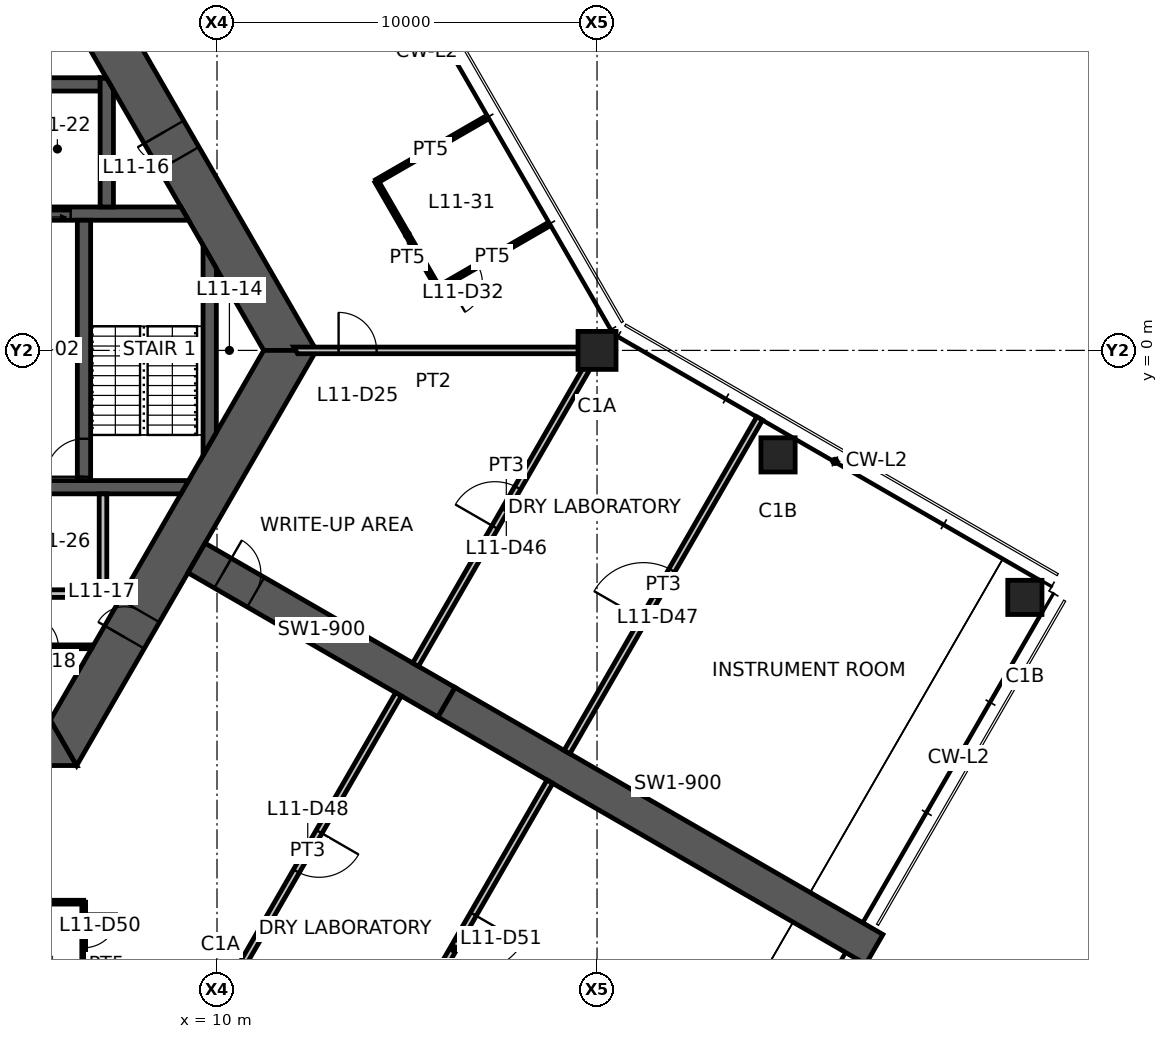
"""IFC4 building model, lengths in metres.
Left out: names, types, materials, properties, quantities, classifications, styles, units other than length and angle.
Written with IfcOpenShell. Run it as: python <this file> out.ifc"""

import sys

from ifc_helpers import new_model, si_unit, direction, frame, frame_2d, origin, origin_2d, place, context, subcontext, project, spatial, polyline, rectangle, hollow_rectangle, outline, extrude, element, fill, save


model = new_model("IFC4")
c1 = context("Model", 3, precision=1e-05, world=origin(), true_north=direction((0.0, 1.0)))
c2 = subcontext(c1, "Body", "Model", "MODEL_VIEW")
j1 = project(units=[si_unit("LENGTHUNIT", "METRE"), si_unit("PLANEANGLEUNIT", "RADIAN")], contexts=[c1])
p1 = place(None, origin())
s1 = spatial("IfcSite", under=j1, at=p1, CompositionType="ELEMENT")
p2 = place(p1, origin())
s2 = spatial("IfcBuilding", under=s1, at=p2, CompositionType="ELEMENT")
p3 = place(p2, frame((0.0, 0.0, 43.6)))
s3 = spatial("IfcBuildingStorey", under=s2, at=p3, CompositionType="ELEMENT", Elevation=43.6)
p4 = place(p3, frame((20.0, 0.0, 0.0), z_axis=(0.0, 0.0, 1.0), x_axis=(1.0, 0.0, 0.0)))
e1 = element("IfcColumn", 1, at=p4, inside=s3, PredefinedType="COLUMN", context=c2, shape_type="SweptSolid", body=[
    extrude(hollow_rectangle(XDim=1.0, YDim=1.0, WallThickness=0.06, at=origin_2d()), origin(), (0.0, 0.0, 1.0), 4.2),
])
for number, where, z_axis, x_axis in (
    (2, (24.763, -2.75, 0.0), (0.0, 0.0, 1.0), (1.0, 0.0, 0.0)),
    (3, (31.258, -6.5, 0.0), (0.0, 0.0, 1.0), (1.0, 0.0, 0.0)),
):
    element("IfcColumn", number, at=place(p3, frame(where, z_axis=z_axis, x_axis=x_axis)), inside=s3, PredefinedType="COLUMN", context=c2, shape_type="SweptSolid", body=[
        extrude(hollow_rectangle(XDim=0.9, YDim=0.9, WallThickness=0.05, at=origin_2d()), origin(), (0.0, 0.0, 1.0), 4.2),
    ])
p5 = place(p3, frame((11.922, 0.0, 0.0), z_axis=(0.0, 0.0, 1.0), x_axis=(-0.500004296715, 0.866022923061, 0.0)))
e4 = element("IfcWall", 4, at=p5, inside=s3, PredefinedType="SHEAR", context=c2, shape_type="SweptSolid", body=[
    extrude(outline(polyline([(-0.346, -0.6), (5.835, -0.6), (6.635, -0.6), (12.269, -0.6), (11.576, 0.6), (6.635, 0.6), (5.835, 0.6), (0.346, 0.6), (-0.346, -0.6)])), origin(), (0.0, 0.0, 1.0), 4.2),
])
p6 = place(p5, frame((5.835, 0.0, 0.0)))
e5 = element("IfcOpeningElement", 5, at=p6, cuts=e4, PredefinedType="OPENING", context=c2, shape_type="SweptSolid", body=[
    extrude(rectangle(XDim=0.8, YDim=2.1, at=frame_2d((0.4, 1.05))), frame((0.0, 0.61, 0.0), z_axis=(0.0, -1.0, 0.0), x_axis=(1.0, 0.0, 0.0)), (0.0, 0.0, 1.0), 1.22),
])
p7 = place(p3, frame((-5.961, -10.325, 0.0), z_axis=(0.0, 0.0, 1.0), x_axis=(1.0, 0.0, 0.0)))
e6 = element("IfcWall", 6, at=p7, inside=s3, PredefinedType="SHEAR", context=c2, shape_type="SweptSolid", body=[
    extrude(outline(polyline([(-0.346, -0.6), (5.461, -0.6), (6.461, -0.6), (12.269, -0.6), (11.576, 0.6), (6.461, 0.6), (5.461, 0.6), (0.346, 0.6), (-0.346, -0.6)])), origin(), (0.0, 0.0, 1.0), 4.2),
])
p8 = place(p7, frame((5.461, 0.0, 0.0)))
e7 = element("IfcOpeningElement", 7, at=p8, cuts=e6, PredefinedType="OPENING", context=c2, shape_type="SweptSolid", body=[
    extrude(rectangle(XDim=1.0, YDim=2.1, at=frame_2d((0.5, 1.05))), frame((0.0, 0.61, 0.0), z_axis=(0.0, -1.0, 0.0), x_axis=(1.0, 0.0, 0.0)), (0.0, 0.0, 1.0), 1.22),
])
p9 = place(p3, frame((5.961, -10.325, 0.0), z_axis=(0.0, 0.0, 1.0), x_axis=(0.500004296715, 0.866022923061, 0.0)))
e8 = element("IfcWall", 8, at=p9, inside=s3, PredefinedType="SHEAR", context=c2, shape_type="SweptSolid", body=[
    extrude(outline(polyline([(-0.346, -0.6), (3.208, -0.6), (4.009, -0.6), (12.269, -0.6), (11.576, 0.6), (4.009, 0.6), (3.208, 0.6), (0.346, 0.6), (-0.346, -0.6)])), origin(), (0.0, 0.0, 1.0), 4.2),
])
p10 = place(p9, frame((3.208, 0.0, 0.0)))
e9 = element("IfcOpeningElement", 9, at=p10, cuts=e8, PredefinedType="OPENING", context=c2, shape_type="SweptSolid", body=[
    extrude(rectangle(XDim=0.8, YDim=2.1, at=frame_2d((0.4, 1.05))), frame((0.0, 0.61, 0.0), z_axis=(0.0, -1.0, 0.0), x_axis=(1.0, 0.0, 0.0)), (0.0, 0.0, 1.0), 1.22),
])
p11 = place(p3, frame((9.461, -5.462, 0.0), z_axis=(0.0, 0.0, 1.0), x_axis=(0.866019116917, -0.500010889016, 0.0)))
e10 = element("IfcWall", 10, at=p11, inside=s3, PredefinedType="SHEAR", context=c2, shape_type="SweptSolid", body=[
    extrude(rectangle(XDim=7.595, YDim=0.9, at=frame_2d((3.798, 0.0))), origin(), (0.0, 0.0, 1.0), 4.2),
])
p12 = place(p11, frame((0.8, 0.0, 0.0)))
e11 = element("IfcOpeningElement", 11, at=p12, cuts=e10, PredefinedType="OPENING", context=c2, shape_type="SweptSolid", body=[
    extrude(rectangle(XDim=1.0, YDim=2.1, at=frame_2d((0.5, 1.05))), frame((0.0, 0.46, 0.0), z_axis=(0.0, -1.0, 0.0), x_axis=(1.0, 0.0, 0.0)), (0.0, 0.0, 1.0), 0.92),
])
p13 = place(p3, frame((16.039, -9.26, 0.0), z_axis=(0.0, 0.0, 1.0), x_axis=(0.866024837091, -0.50000098154, 0.0)))
e12 = element("IfcWall", 12, at=p13, inside=s3, PredefinedType="SHEAR", context=c2, shape_type="SweptSolid", body=[
    extrude(rectangle(XDim=13.0, YDim=0.9, at=frame_2d((6.5, 0.0))), origin(), (0.0, 0.0, 1.0), 4.2),
])
p14 = place(p3, frame((1.425, 3.6, 0.0), z_axis=(0.0, 0.0, 1.0), x_axis=(1.0, 0.0, 0.0)))
e13 = element("IfcWall", 13, at=p14, inside=s3, PredefinedType="SHEAR", context=c2, shape_type="SweptSolid", body=[
    extrude(outline(polyline([(0.0, -0.175), (3.425, -0.175), (4.725, -0.175), (7.827, -0.175), (7.625, 0.175), (4.725, 0.175), (3.425, 0.175), (0.0, 0.175), (0.0, -0.175)])), origin(), (0.0, 0.0, 1.0), 4.2),
])
p15 = place(p14, frame((3.425, 0.0, 0.0)))
e14 = element("IfcOpeningElement", 14, at=p15, cuts=e13, PredefinedType="OPENING", context=c2, shape_type="SweptSolid", body=[
    extrude(rectangle(XDim=1.3, YDim=2.1, at=frame_2d((0.65, 1.05))), frame((0.0, 0.185, 0.0), z_axis=(0.0, -1.0, 0.0), x_axis=(1.0, 0.0, 0.0)), (0.0, 0.0, 1.0), 0.37),
])
p16 = place(p3, frame((1.425, -3.6, 0.0), z_axis=(0.0, 0.0, 1.0), x_axis=(1.0, 0.0, 0.0)))
e15 = element("IfcWall", 15, at=p16, inside=s3, PredefinedType="SHEAR", context=c2, shape_type="SweptSolid", body=[
    extrude(outline(polyline([(0.0, -0.175), (1.125, -0.175), (2.125, -0.175), (7.625, -0.175), (7.827, 0.175), (2.125, 0.175), (1.125, 0.175), (0.0, 0.175), (0.0, -0.175)])), origin(), (0.0, 0.0, 1.0), 4.2),
])
p17 = place(p16, frame((1.125, 0.0, 0.0)))
e16 = element("IfcOpeningElement", 16, at=p17, cuts=e15, PredefinedType="OPENING", context=c2, shape_type="SweptSolid", body=[
    extrude(rectangle(XDim=1.0, YDim=2.1, at=frame_2d((0.5, 1.05))), frame((0.0, 0.185, 0.0), z_axis=(0.0, -1.0, 0.0), x_axis=(1.0, 0.0, 0.0)), (0.0, 0.0, 1.0), 0.37),
])
p18 = place(p3, frame((6.5, -3.425, 0.0), z_axis=(0.0, 0.0, 1.0), x_axis=(0.0, 1.0, 0.0)))
e17 = element("IfcWall", 17, at=p18, inside=s3, PredefinedType="SHEAR", context=c2, shape_type="SweptSolid", body=[
    extrude(rectangle(XDim=6.85, YDim=0.35, at=frame_2d((3.425, 0.0))), origin(), (0.0, 0.0, 1.0), 4.2),
])
p19 = place(p18, frame((0.1, 0.0, 0.0)))
e18 = element("IfcOpeningElement", 18, at=p19, cuts=e17, PredefinedType="OPENING", context=c2, shape_type="SweptSolid", body=[
    extrude(rectangle(XDim=1.0, YDim=2.1, at=frame_2d((0.5, 1.05))), frame((0.0, 0.185, 0.0), z_axis=(0.0, -1.0, 0.0), x_axis=(1.0, 0.0, 0.0)), (0.0, 0.0, 1.0), 0.37),
])
p20 = place(p3, frame((4.675, 7.0, 0.0), z_axis=(0.0, 0.0, 1.0), x_axis=(1.0, 0.0, 0.0)))
e19 = element("IfcWall", 19, at=p20, inside=s3, PredefinedType="SHEAR", context=c2, shape_type="SweptSolid", body=[
    extrude(rectangle(XDim=2.25, YDim=0.35, at=frame_2d((1.125, 0.0))), origin(), (0.0, 0.0, 1.0), 4.2),
])
p21 = place(p3, frame((7.1, 3.775, 0.0), z_axis=(0.0, 0.0, 1.0), x_axis=(0.0, 1.0, 0.0)))
e20 = element("IfcWall", 20, at=p21, inside=s3, PredefinedType="SHEAR", context=c2, shape_type="SweptSolid", body=[
    extrude(outline(polyline([(0.0, -0.175), (3.074, -0.175), (3.377, 0.0), (3.4, 0.175), (0.0, 0.175), (0.0, -0.175)])), origin(), (0.0, 0.0, 1.0), 4.2),
])
p22 = place(p3, frame((9.808, -2.462, 0.0), z_axis=(0.0, 0.0, 1.0), x_axis=(0.0, 1.0, 0.0)))
e21 = element("IfcWall", 21, at=p22, inside=s3, PredefinedType="SHEAR", context=c2, shape_type="SweptSolid", body=[
    extrude(outline(polyline([(0.303, -0.175), (4.621, -0.175), (5.228, 0.175), (-0.303, 0.175), (0.303, -0.175)])), origin(), (0.0, 0.0, 1.0), 4.2),
])
p23 = place(p3, frame((4.675, -6.4, 0.0), z_axis=(0.0, 0.0, 1.0), x_axis=(1.0, 0.0, 0.0)))
e22 = element("IfcWall", 22, at=p23, inside=s3, PredefinedType="STANDARD", context=c2, shape_type="SweptSolid", body=[
    extrude(rectangle(XDim=2.425, YDim=0.2, at=frame_2d((1.212, 0.0))), origin(), (0.0, 0.0, 1.0), 4.2),
])
p24 = place(p3, frame((7.0, -3.775, 0.0), z_axis=(0.0, 0.0, 1.0), x_axis=(0.0, -1.0, 0.0)))
e23 = element("IfcWall", 23, at=p24, inside=s3, PredefinedType="STANDARD", context=c2, shape_type="SweptSolid", body=[
    extrude(rectangle(XDim=2.525, YDim=0.2, at=frame_2d((1.263, 0.0))), origin(), (0.0, 0.0, 1.0), 4.2),
])
p25 = place(p3, frame((4.675, -7.8, 0.0), z_axis=(0.0, 0.0, 1.0), x_axis=(1.0, 0.0, 0.0)))
e24 = element("IfcWall", 24, at=p25, inside=s3, PredefinedType="PARTITIONING", context=c2, shape_type="SweptSolid", body=[
    extrude(outline(polyline([(0.0, -0.05), (0.35, -0.05), (1.15, -0.05), (2.022, -0.05), (2.051, 0.0), (2.057, 0.05), (1.15, 0.05), (0.35, 0.05), (0.0, 0.05), (0.0, -0.05)])), origin(), (0.0, 0.0, 1.0), 3.23),
])
p26 = place(p25, frame((0.35, 0.0, 0.0)))
e25 = element("IfcOpeningElement", 25, at=p26, cuts=e24, PredefinedType="OPENING", context=c2, shape_type="SweptSolid", body=[
    extrude(rectangle(XDim=0.8, YDim=2.1, at=frame_2d((0.4, 1.05))), frame((0.0, 0.06, 0.0), z_axis=(0.0, -1.0, 0.0), x_axis=(1.0, 0.0, 0.0)), (0.0, 0.0, 1.0), 0.12),
])
p27 = place(p3, frame((12.07, 0.0, 0.0), z_axis=(0.0, 0.0, 1.0), x_axis=(1.0, 0.0, 0.0)))
e26 = element("IfcWall", 26, at=p27, inside=s3, PredefinedType="PARTITIONING", context=c2, shape_type="SweptSolid", body=[
    extrude(outline(polyline([(0.051, -0.087), (1.129, -0.087), (2.129, -0.087), (7.93, -0.087), (7.93, 0.087), (2.129, 0.087), (1.129, 0.087), (-0.051, 0.087), (0.051, -0.087)])), origin(), (0.0, 0.0, 1.0), 3.33),
])
p28 = place(p27, frame((1.129, 0.0, 0.0)))
e27 = element("IfcOpeningElement", 27, at=p28, cuts=e26, PredefinedType="OPENING", context=c2, shape_type="SweptSolid", body=[
    extrude(rectangle(XDim=1.0, YDim=2.1, at=frame_2d((0.5, 1.05))), frame((0.0, 0.098, 0.0), z_axis=(0.0, -1.0, 0.0), x_axis=(1.0, 0.0, 0.0)), (0.0, 0.0, 1.0), 0.195),
])
p29 = place(p3, frame((14.198, 4.449, 0.0), z_axis=(0.0, 0.0, 1.0), x_axis=(0.866008333849, 0.50002956483, 0.0)))
e28 = element("IfcWall", 28, at=p29, inside=s3, PredefinedType="PARTITIONING", context=c2, shape_type="SweptSolid", body=[
    extrude(rectangle(XDim=3.28, YDim=0.1, at=frame_2d((1.64, 0.0))), origin(), (0.0, 0.0, 1.0), 3.23),
])
p30 = place(p3, frame((15.822, 1.637, 0.0), z_axis=(0.0, 0.0, 1.0), x_axis=(-0.500013214685, 0.866017774148, 0.0)))
e29 = element("IfcWall", 29, at=p30, inside=s3, PredefinedType="PARTITIONING", context=c2, shape_type="SweptSolid", body=[
    extrude(rectangle(XDim=3.247, YDim=0.1, at=frame_2d((1.623, 0.0))), origin(), (0.0, 0.0, 1.0), 3.23),
])
p31 = place(p3, frame((18.662, 3.277, 0.0), z_axis=(0.0, 0.0, 1.0), x_axis=(-0.866008333849, -0.50002956483, 0.0)))
e30 = element("IfcWall", 30, at=p31, inside=s3, PredefinedType="PARTITIONING", context=c2, shape_type="SweptSolid", body=[
    extrude(rectangle(XDim=3.28, YDim=0.1, at=frame_2d((1.64, 0.0))), origin(), (0.0, 0.0, 1.0), 3.23),
])
p32 = place(p31, frame((2.08, 0.0, 0.0)))
e31 = element("IfcOpeningElement", 31, at=p32, cuts=e30, PredefinedType="OPENING", context=c2, shape_type="SweptSolid", body=[
    extrude(rectangle(XDim=0.9, YDim=2.1, at=frame_2d((0.45, 1.05))), frame((0.0, 0.06, 0.0), z_axis=(0.0, -1.0, 0.0), x_axis=(1.0, 0.0, 0.0)), (0.0, 0.0, 1.0), 0.12),
])
p33 = place(p3, frame((15.225, -8.271, 0.0), z_axis=(0.0, 0.0, 1.0), x_axis=(0.499993908199, 0.866028920859, 0.0)))
e32 = element("IfcWall", 32, at=p33, inside=s3, PredefinedType="PARTITIONING", context=c2, shape_type="SweptSolid", body=[
    extrude(rectangle(XDim=9.55, YDim=0.175, at=frame_2d((4.775, 0.0))), origin(), (0.0, 0.0, 1.0), 3.238),
])
p34 = place(p33, frame((4.175, 0.0, 0.0)))
e33 = element("IfcOpeningElement", 33, at=p34, cuts=e32, PredefinedType="OPENING", context=c2, shape_type="SweptSolid", body=[
    extrude(rectangle(XDim=1.2, YDim=2.1, at=frame_2d((0.6, 1.05))), frame((0.0, 0.098, 0.0), z_axis=(0.0, -1.0, 0.0), x_axis=(1.0, 0.0, 0.0)), (0.0, 0.0, 1.0), 0.195),
])
p35 = place(p3, frame((19.209, -10.571, 0.0), z_axis=(0.0, 0.0, 1.0), x_axis=(0.500005203629, 0.866022399447, 0.0)))
e34 = element("IfcWall", 34, at=p35, inside=s3, PredefinedType="PARTITIONING", context=c2, shape_type="SweptSolid", body=[
    extrude(rectangle(XDim=10.14, YDim=0.175, at=frame_2d((5.07, 0.0))), origin(), (0.0, 0.0, 1.0), 4.03),
])
p36 = place(p35, frame((4.025, 0.0, 0.0)))
e35 = element("IfcOpeningElement", 35, at=p36, cuts=e34, PredefinedType="OPENING", context=c2, shape_type="SweptSolid", body=[
    extrude(rectangle(XDim=1.5, YDim=2.1, at=frame_2d((0.75, 1.05))), frame((0.0, 0.098, 0.0), z_axis=(0.0, -1.0, 0.0), x_axis=(1.0, 0.0, 0.0)), (0.0, 0.0, 1.0), 0.195),
])
p37 = place(p3, frame((14.775, -9.05, 0.0), z_axis=(0.0, 0.0, 1.0), x_axis=(-0.499993908199, -0.866028920859, 0.0)))
e36 = element("IfcWall", 36, at=p37, inside=s3, PredefinedType="PARTITIONING", context=c2, shape_type="SweptSolid", body=[
    extrude(rectangle(XDim=9.55, YDim=0.175, at=frame_2d((4.775, 0.0))), origin(), (0.0, 0.0, 1.0), 3.238),
])
p38 = place(p37, frame((4.175, 0.0, 0.0)))
e37 = element("IfcOpeningElement", 37, at=p38, cuts=e36, PredefinedType="OPENING", context=c2, shape_type="SweptSolid", body=[
    extrude(rectangle(XDim=1.2, YDim=2.1, at=frame_2d((0.6, 1.05))), frame((0.0, 0.098, 0.0), z_axis=(0.0, -1.0, 0.0), x_axis=(1.0, 0.0, 0.0)), (0.0, 0.0, 1.0), 0.195),
])
p39 = place(p3, frame((3.246, -14.521, 0.0), z_axis=(0.0, 0.0, 1.0), x_axis=(1.0, 0.0, 0.0)))
e38 = element("IfcWall", 38, at=p39, inside=s3, PredefinedType="PARTITIONING", context=c2, shape_type="SweptSolid", body=[
    extrude(rectangle(XDim=3.247, YDim=0.1, at=frame_2d((1.623, 0.0))), origin(), (0.0, 0.0, 1.0), 3.23),
])
p40 = place(p3, frame((6.493, -14.521, 0.0), z_axis=(0.0, 0.0, 1.0), x_axis=(0.0, -1.0, 0.0)))
e39 = element("IfcWall", 39, at=p40, inside=s3, PredefinedType="PARTITIONING", context=c2, shape_type="SweptSolid", body=[
    extrude(rectangle(XDim=3.28, YDim=0.1, at=frame_2d((1.64, 0.0))), origin(), (0.0, 0.0, 1.0), 3.23),
])
p41 = place(p40, frame((0.3, 0.0, 0.0)))
e40 = element("IfcOpeningElement", 40, at=p41, cuts=e39, PredefinedType="OPENING", context=c2, shape_type="SweptSolid", body=[
    extrude(rectangle(XDim=0.9, YDim=2.1, at=frame_2d((0.45, 1.05))), frame((0.0, 0.06, 0.0), z_axis=(0.0, -1.0, 0.0), x_axis=(1.0, 0.0, 0.0)), (0.0, 0.0, 1.0), 0.12),
])
p42 = place(p3, frame((18.759, -11.35, 0.0), z_axis=(0.0, 0.0, 1.0), x_axis=(-0.500005203629, -0.866022399447, 0.0)))
e41 = element("IfcWall", 41, at=p42, inside=s3, PredefinedType="PARTITIONING", context=c2, shape_type="SweptSolid", body=[
    extrude(rectangle(XDim=10.14, YDim=0.175, at=frame_2d((5.07, 0.0))), origin(), (0.0, 0.0, 1.0), 4.03),
])
p43 = place(p42, frame((4.025, 0.0, 0.0)))
e42 = element("IfcOpeningElement", 42, at=p43, cuts=e41, PredefinedType="OPENING", context=c2, shape_type="SweptSolid", body=[
    extrude(rectangle(XDim=1.5, YDim=2.1, at=frame_2d((0.75, 1.05))), frame((0.0, 0.098, 0.0), z_axis=(0.0, -1.0, 0.0), x_axis=(1.0, 0.0, 0.0)), (0.0, 0.0, 1.0), 0.195),
])
p44 = place(p6, origin())
e43 = element("IfcDoor", 43, at=p44, inside=s3, OperationType="SINGLE_SWING_RIGHT", PredefinedType="DOOR", context=c2, shape_type="SweptSolid", body=[
    extrude(rectangle(XDim=0.8, YDim=2.1, at=frame_2d((0.4, 1.05))), frame((0.0, 0.025, 0.0), z_axis=(0.0, -1.0, 0.0), x_axis=(1.0, 0.0, 0.0)), (0.0, 0.0, 1.0), 0.05),
])
fill(e5, e43)
p45 = place(p10, origin())
e44 = element("IfcDoor", 44, at=p45, inside=s3, OperationType="SINGLE_SWING_LEFT", PredefinedType="DOOR", context=c2, shape_type="SweptSolid", body=[
    extrude(rectangle(XDim=0.8, YDim=2.1, at=frame_2d((0.4, 1.05))), frame((0.0, 0.025, 0.0), z_axis=(0.0, -1.0, 0.0), x_axis=(1.0, 0.0, 0.0)), (0.0, 0.0, 1.0), 0.05),
])
fill(e9, e44)
p46 = place(p19, origin())
e45 = element("IfcDoor", 45, at=p46, inside=s3, OperationType="SINGLE_SWING_LEFT", PredefinedType="DOOR", context=c2, shape_type="SweptSolid", body=[
    extrude(rectangle(XDim=1.0, YDim=2.1, at=frame_2d((0.5, 1.05))), frame((0.0, 0.025, 0.0), z_axis=(0.0, -1.0, 0.0), x_axis=(1.0, 0.0, 0.0)), (0.0, 0.0, 1.0), 0.05),
])
fill(e18, e45)
p47 = place(p12, origin())
e46 = element("IfcDoor", 46, at=p47, inside=s3, OperationType="SINGLE_SWING_LEFT", PredefinedType="DOOR", context=c2, shape_type="SweptSolid", body=[
    extrude(rectangle(XDim=1.0, YDim=2.1, at=frame_2d((0.5, 1.05))), frame((0.0, 0.025, 0.0), z_axis=(0.0, -1.0, 0.0), x_axis=(1.0, 0.0, 0.0)), (0.0, 0.0, 1.0), 0.05),
])
fill(e11, e46)
p48 = place(p26, origin())
e47 = element("IfcDoor", 47, at=p48, inside=s3, OperationType="SINGLE_SWING_LEFT", PredefinedType="DOOR", context=c2, shape_type="SweptSolid", body=[
    extrude(rectangle(XDim=0.8, YDim=2.1, at=frame_2d((0.4, 1.05))), frame((0.0, 0.025, 0.0), z_axis=(0.0, -1.0, 0.0), x_axis=(1.0, 0.0, 0.0)), (0.0, 0.0, 1.0), 0.05),
])
fill(e25, e47)
p49 = place(p28, origin())
e48 = element("IfcDoor", 48, at=p49, inside=s3, OperationType="SINGLE_SWING_LEFT", PredefinedType="DOOR", context=c2, shape_type="SweptSolid", body=[
    extrude(rectangle(XDim=1.0, YDim=2.1, at=frame_2d((0.5, 1.05))), frame((0.0, 0.025, 0.0), z_axis=(0.0, -1.0, 0.0), x_axis=(1.0, 0.0, 0.0)), (0.0, 0.0, 1.0), 0.05),
])
fill(e27, e48)
p50 = place(p32, origin())
e49 = element("IfcDoor", 49, at=p50, inside=s3, OperationType="SINGLE_SWING_RIGHT", PredefinedType="DOOR", context=c2, shape_type="SweptSolid", body=[
    extrude(rectangle(XDim=0.9, YDim=2.1, at=frame_2d((0.45, 1.05))), frame((0.0, 0.025, 0.0), z_axis=(0.0, -1.0, 0.0), x_axis=(1.0, 0.0, 0.0)), (0.0, 0.0, 1.0), 0.05),
])
fill(e31, e49)
p51 = place(p34, origin())
e50 = element("IfcDoor", 50, at=p51, inside=s3, OperationType="DOUBLE_DOOR_SINGLE_SWING", PredefinedType="DOOR", context=c2, shape_type="SweptSolid", body=[
    extrude(rectangle(XDim=1.2, YDim=2.1, at=frame_2d((0.6, 1.05))), frame((0.0, 0.025, 0.0), z_axis=(0.0, -1.0, 0.0), x_axis=(1.0, 0.0, 0.0)), (0.0, 0.0, 1.0), 0.05),
])
fill(e33, e50)
p52 = place(p36, origin())
e51 = element("IfcDoor", 51, at=p52, inside=s3, OperationType="DOUBLE_DOOR_SINGLE_SWING", PredefinedType="DOOR", context=c2, shape_type="SweptSolid", body=[
    extrude(rectangle(XDim=1.5, YDim=2.1, at=frame_2d((0.75, 1.05))), frame((0.0, 0.025, 0.0), z_axis=(0.0, -1.0, 0.0), x_axis=(1.0, 0.0, 0.0)), (0.0, 0.0, 1.0), 0.05),
])
fill(e35, e51)
p53 = place(p38, origin())
e52 = element("IfcDoor", 52, at=p53, inside=s3, OperationType="DOUBLE_DOOR_SINGLE_SWING", PredefinedType="DOOR", context=c2, shape_type="SweptSolid", body=[
    extrude(rectangle(XDim=1.2, YDim=2.1, at=frame_2d((0.6, 1.05))), frame((0.0, 0.025, 0.0), z_axis=(0.0, -1.0, 0.0), x_axis=(1.0, 0.0, 0.0)), (0.0, 0.0, 1.0), 0.05),
])
fill(e37, e52)
p54 = place(p41, origin())
e53 = element("IfcDoor", 53, at=p54, inside=s3, OperationType="SINGLE_SWING_LEFT", PredefinedType="DOOR", context=c2, shape_type="SweptSolid", body=[
    extrude(rectangle(XDim=0.9, YDim=2.1, at=frame_2d((0.45, 1.05))), frame((0.0, 0.025, 0.0), z_axis=(0.0, -1.0, 0.0), x_axis=(1.0, 0.0, 0.0)), (0.0, 0.0, 1.0), 0.05),
])
fill(e40, e53)
p55 = place(p43, origin())
e54 = element("IfcDoor", 54, at=p55, inside=s3, OperationType="DOUBLE_DOOR_SINGLE_SWING", PredefinedType="DOOR", context=c2, shape_type="SweptSolid", body=[
    extrude(rectangle(XDim=1.5, YDim=2.1, at=frame_2d((0.75, 1.05))), frame((0.0, 0.025, 0.0), z_axis=(0.0, -1.0, 0.0), x_axis=(1.0, 0.0, 0.0)), (0.0, 0.0, 1.0), 0.05),
])
fill(e42, e54)
p56 = place(p15, origin())
e55 = element("IfcDoor", 55, at=p56, inside=s3, OperationType="DOUBLE_DOOR_SLIDING", PredefinedType="DOOR", context=c2, shape_type="SweptSolid", body=[
    extrude(rectangle(XDim=1.3, YDim=2.1, at=frame_2d((0.65, 1.05))), frame((0.0, 0.025, 0.0), z_axis=(0.0, -1.0, 0.0), x_axis=(1.0, 0.0, 0.0)), (0.0, 0.0, 1.0), 0.05),
])
fill(e14, e55)
save(model, sys.argv[1])
